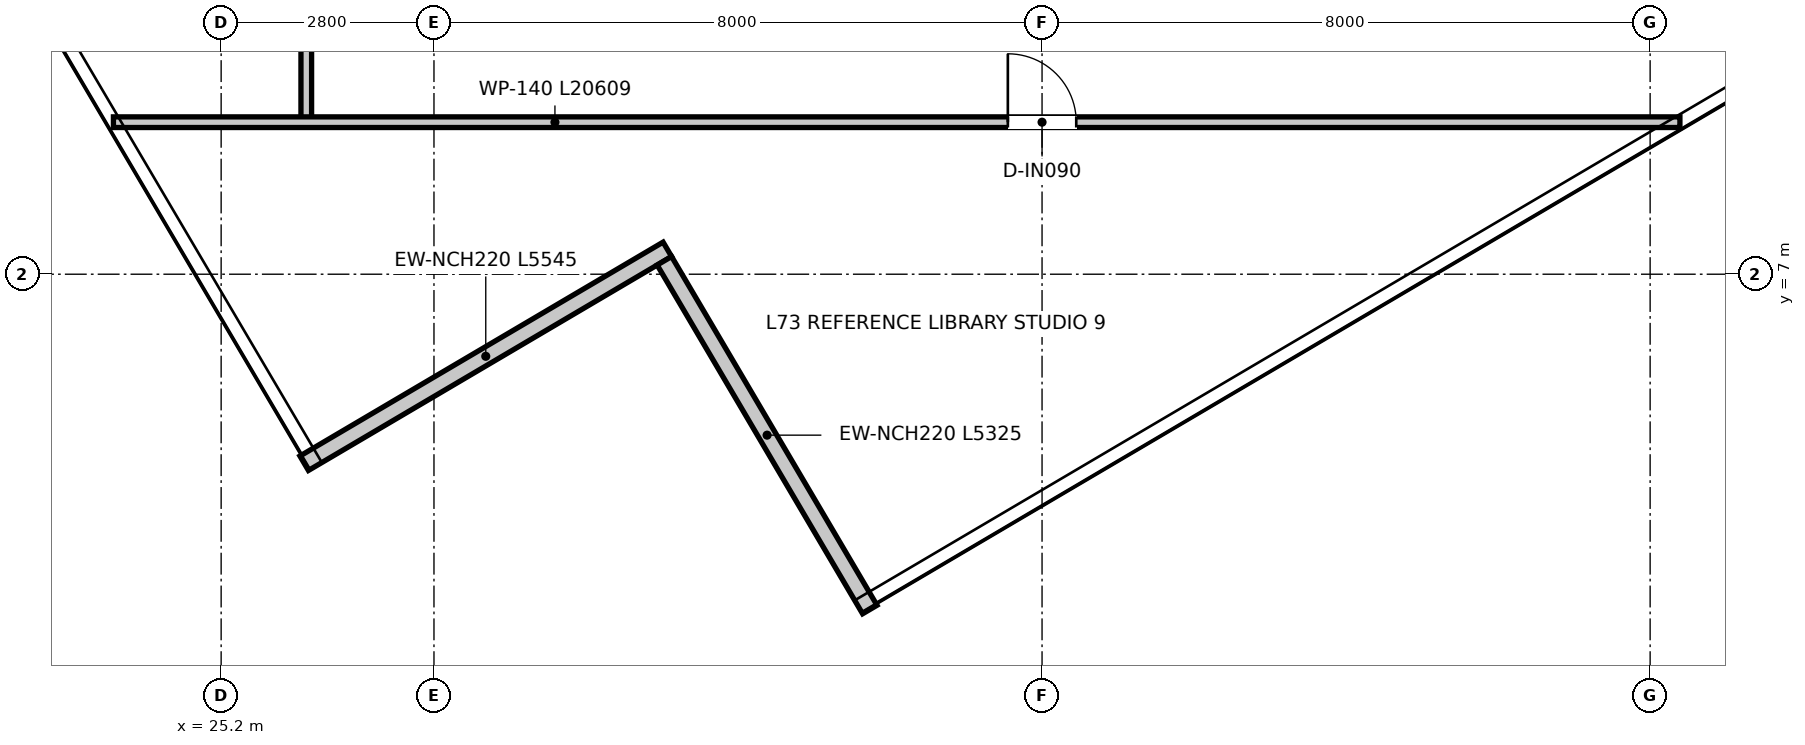
"""IFC4 building model, lengths in metres.
Left out: names, types, materials, properties, quantities, classifications, styles, units other than length and angle.
Written with IfcOpenShell. Run it as: python <this file> out.ifc"""

import sys

from ifc_helpers import new_model, si_unit, direction, frame, frame_2d, origin, place, context, subcontext, project, spatial, rectangle, extrude, element, fill, save


model = new_model("IFC4")
c1 = context("Model", 3, precision=1e-05, world=origin(), true_north=direction((0.0, 1.0)))
c2 = subcontext(c1, "Body", "Model", "MODEL_VIEW")
j1 = project(units=[si_unit("LENGTHUNIT", "METRE"), si_unit("PLANEANGLEUNIT", "RADIAN")], contexts=[c1])
p1 = place(None, origin())
s1 = spatial("IfcSite", under=j1, at=p1, CompositionType="ELEMENT")
p2 = place(p1, origin())
s2 = spatial("IfcBuilding", under=s1, at=p2, CompositionType="ELEMENT")
p3 = place(p2, frame((0.0, 0.0, 299.0)))
s3 = spatial("IfcBuildingStorey", under=s2, at=p3, CompositionType="ELEMENT", Elevation=299.0)
p4 = place(p3, frame((26.292, 4.513, 0.0), z_axis=(0.0, 0.0, 1.0), x_axis=(0.861621670092, 0.507551078836, 0.0)))
e1 = element("IfcWall", 1, at=p4, inside=s3, PredefinedType="ELEMENTEDWALL", context=c2, shape_type="SweptSolid", body=[
    extrude(rectangle(XDim=5.545, YDim=0.22, at=frame_2d((2.772, 0.0))), origin(), (0.0, 0.0, 1.0), 3.67),
])
p5 = place(p3, frame((31.031, 7.177, 0.0), z_axis=(0.0, 0.0, 1.0), x_axis=(0.507540984104, -0.861627616465, 0.0)))
e2 = element("IfcWall", 2, at=p5, inside=s3, PredefinedType="ELEMENTEDWALL", context=c2, shape_type="SweptSolid", body=[
    extrude(rectangle(XDim=5.325, YDim=0.22, at=frame_2d((2.663, 0.0))), origin(), (0.0, 0.0, 1.0), 3.67),
])
p6 = place(p3, frame((26.32, 9.0, 0.0), z_axis=(0.0, 0.0, 1.0), x_axis=(0.0, 1.0, 0.0)))
e3 = element("IfcWall", 3, at=p6, inside=s3, PredefinedType="PARTITIONING", context=c2, shape_type="SweptSolid", body=[
    extrude(rectangle(XDim=19.66, YDim=0.14, at=frame_2d((9.83, 0.0))), origin(), (0.0, 0.0, 1.0), 3.13),
])
p7 = place(p6, frame((18.3, 0.0, 0.0)))
e4 = element("IfcOpeningElement", 4, at=p7, cuts=e3, PredefinedType="OPENING", context=c2, shape_type="SweptSolid", body=[
    extrude(rectangle(XDim=0.9, YDim=2.1, at=frame_2d((0.45, 1.05))), frame((0.0, 0.08, 0.0), z_axis=(0.0, -1.0, 0.0), x_axis=(1.0, 0.0, 0.0)), (0.0, 0.0, 1.0), 0.16),
])
p8 = place(p6, frame((1.65, 0.0, 0.0)))
e5 = element("IfcOpeningElement", 5, at=p8, cuts=e3, PredefinedType="OPENING", context=c2, shape_type="SweptSolid", body=[
    extrude(rectangle(XDim=0.9, YDim=2.1, at=frame_2d((0.45, 1.05))), frame((0.0, 0.08, 0.0), z_axis=(0.0, -1.0, 0.0), x_axis=(1.0, 0.0, 0.0)), (0.0, 0.0, 1.0), 0.16),
])
p9 = place(p6, frame((8.7, 0.0, 0.0)))
e6 = element("IfcOpeningElement", 6, at=p9, cuts=e3, PredefinedType="OPENING", context=c2, shape_type="SweptSolid", body=[
    extrude(rectangle(XDim=0.9, YDim=2.1, at=frame_2d((0.45, 1.05))), frame((0.0, 0.08, 0.0), z_axis=(0.0, -1.0, 0.0), x_axis=(1.0, 0.0, 0.0)), (0.0, 0.0, 1.0), 0.16),
])
p10 = place(p6, frame((11.85, 0.0, 0.0)))
e7 = element("IfcOpeningElement", 7, at=p10, cuts=e3, PredefinedType="OPENING", context=c2, shape_type="SweptSolid", body=[
    extrude(rectangle(XDim=0.9, YDim=2.1, at=frame_2d((0.45, 1.05))), frame((0.0, 0.08, 0.0), z_axis=(0.0, -1.0, 0.0), x_axis=(1.0, 0.0, 0.0)), (0.0, 0.0, 1.0), 0.16),
])
p11 = place(p6, frame((15.86, 0.0, 0.0)))
e8 = element("IfcOpeningElement", 8, at=p11, cuts=e3, PredefinedType="OPENING", context=c2, shape_type="SweptSolid", body=[
    extrude(rectangle(XDim=0.9, YDim=2.1, at=frame_2d((0.45, 1.05))), frame((0.0, 0.08, 0.0), z_axis=(0.0, -1.0, 0.0), x_axis=(1.0, 0.0, 0.0)), (0.0, 0.0, 1.0), 0.16),
])
p12 = place(p3, frame((23.783, 9.0, 0.0), z_axis=(0.0, 0.0, 1.0), x_axis=(1.0, 0.0, 0.0)))
e9 = element("IfcWall", 9, at=p12, inside=s3, PredefinedType="PARTITIONING", context=c2, shape_type="SweptSolid", body=[
    extrude(rectangle(XDim=20.609, YDim=0.14, at=frame_2d((10.304, 0.0))), origin(), (0.0, 0.0, 1.0), 3.67),
])
p13 = place(p12, frame((11.767, 0.0, 0.0)))
e10 = element("IfcOpeningElement", 10, at=p13, cuts=e9, PredefinedType="OPENING", context=c2, shape_type="SweptSolid", body=[
    extrude(rectangle(XDim=0.9, YDim=2.1, at=frame_2d((0.45, 1.05))), frame((0.0, 0.08, 0.0), z_axis=(0.0, -1.0, 0.0), x_axis=(1.0, 0.0, 0.0)), (0.0, 0.0, 1.0), 0.16),
])
p14 = place(p13, origin())
e11 = element("IfcDoor", 11, at=p14, inside=s3, OperationType="SINGLE_SWING_LEFT", PredefinedType="DOOR", context=c2, shape_type="SweptSolid", body=[
    extrude(rectangle(XDim=0.9, YDim=2.1, at=frame_2d((0.45, 1.05))), frame((0.0, 0.025, 0.0), z_axis=(0.0, -1.0, 0.0), x_axis=(1.0, 0.0, 0.0)), (0.0, 0.0, 1.0), 0.05),
])
fill(e10, e11)
save(model, sys.argv[1])
